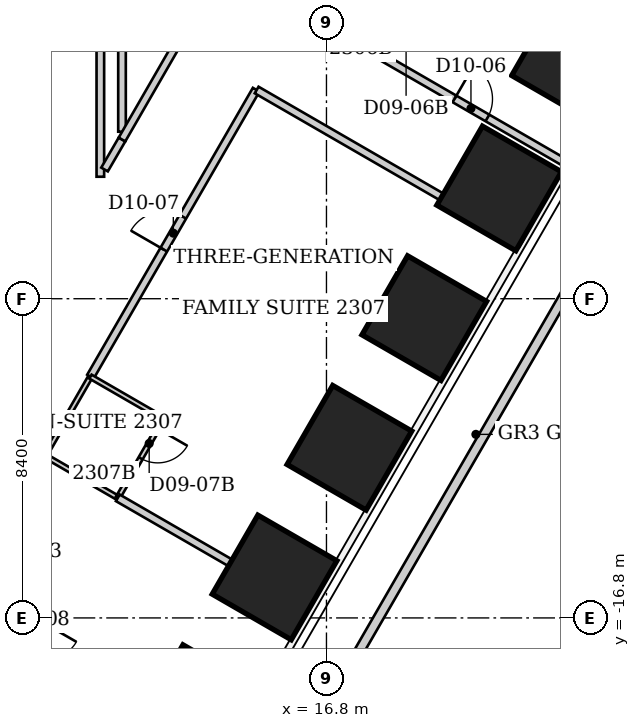
"""IFC4 building model, lengths in metres.
Left out: names, types, materials, properties, quantities, classifications, styles, units other than length and angle.
Written with IfcOpenShell. Run it as: python <this file> out.ifc"""

import sys

from ifc_helpers import new_model, si_unit, direction, frame, frame_2d, origin, origin_2d, place, context, subcontext, project, spatial, rectangle, extrude, clip, halfspace, element, fill, save


model = new_model("IFC4")
c1 = context("Model", 3, precision=1e-05, world=origin(), true_north=direction((0.0, 1.0)))
c2 = subcontext(c1, "Body", "Model", "MODEL_VIEW")
j1 = project(units=[si_unit("LENGTHUNIT", "METRE"), si_unit("PLANEANGLEUNIT", "RADIAN")], contexts=[c1])
p1 = place(None, origin())
s1 = spatial("IfcSite", under=j1, at=p1, CompositionType="ELEMENT")
p2 = place(p1, origin())
s2 = spatial("IfcBuilding", under=s1, at=p2, CompositionType="ELEMENT")
p3 = place(p2, frame((0.0, 0.0, 96.8)))
s3 = spatial("IfcBuildingStorey", under=s2, at=p3, CompositionType="ELEMENT", Elevation=96.8)
p4 = place(p3, frame((23.314, -2.087, -0.064), z_axis=(0.0, 0.0, 1.0), x_axis=(0.866025403784, -0.5, 0.0)))
e1 = element("IfcColumn", 1, at=p4, inside=s3, PredefinedType="COLUMN", context=c2, shape_type="SweptSolid", body=[
    clip(extrude(rectangle(XDim=2.4, YDim=2.4, at=origin_2d()), origin(), (0.0, 0.0, 1.0), 3.865), halfspace(frame((0.0, 0.0, 0.064)), True)),
])
p5 = place(p3, frame((21.344, -5.499, -0.056), z_axis=(0.0, 0.0, 1.0), x_axis=(0.866025403784, -0.5, 0.0)))
e2 = element("IfcColumn", 2, at=p5, inside=s3, PredefinedType="COLUMN", context=c2, shape_type="SweptSolid", body=[
    clip(extrude(rectangle(XDim=2.4, YDim=2.4, at=origin_2d()), origin(), (0.0, 0.0, 1.0), 3.856), halfspace(frame((0.0, 0.0, 0.056)), True)),
])
for number, where, z_axis, x_axis in (
    (3, (19.374, -8.911, -0.048), (0.0, 0.0, 1.0), (0.866, -0.5, 0.0)),
    (4, (17.404, -12.323, -0.048), (0.0, 0.0, 1.0), (0.866, -0.5, 0.0)),
):
    element("IfcColumn", number, at=place(p3, frame(where, z_axis=z_axis, x_axis=x_axis)), inside=s3, PredefinedType="COLUMN", context=c2, shape_type="SweptSolid", body=[
        clip(extrude(rectangle(XDim=2.4, YDim=2.4, at=origin_2d()), origin(), (0.0, 0.0, 1.0), 3.848), halfspace(frame((0.0, 0.0, 0.048)), True)),
    ])
p6 = place(p3, frame((15.434, -15.735, -0.056), z_axis=(0.0, 0.0, 1.0), x_axis=(0.866025403784, -0.5, 0.0)))
e5 = element("IfcColumn", 5, at=p6, inside=s3, PredefinedType="COLUMN", context=c2, shape_type="SweptSolid", body=[
    clip(extrude(rectangle(XDim=2.4, YDim=2.4, at=origin_2d()), origin(), (0.0, 0.0, 1.0), 3.856), halfspace(frame((0.0, 0.0, 0.056)), True)),
])
p7 = place(p3, frame((13.464, -19.147, -0.064), z_axis=(0.0, 0.0, 1.0), x_axis=(0.866025403784, -0.5, 0.0)))
e6 = element("IfcColumn", 6, at=p7, inside=s3, PredefinedType="COLUMN", context=c2, shape_type="SweptSolid", body=[
    clip(extrude(rectangle(XDim=2.4, YDim=2.4, at=origin_2d()), origin(), (0.0, 0.0, 1.0), 3.865), halfspace(frame((0.0, 0.0, 0.064)), True)),
])
p8 = place(p3, frame((11.024, -29.171, 0.0), z_axis=(0.0, 0.0, 1.0), x_axis=(0.499999235055, 0.866025845425, 0.0)))
e7 = element("IfcWall", 7, at=p8, inside=s3, PredefinedType="PARAPET", context=c2, shape_type="SweptSolid", body=[
    extrude(rectangle(XDim=39.5, YDim=0.25, at=frame_2d((19.75, 0.0))), origin(), (0.0, 0.0, 1.0), 1.1),
])
p9 = place(p3, frame((8.34, -18.89, 0.0), z_axis=(0.0, 0.0, 1.0), x_axis=(0.499159685399, 0.866510016372, 0.0)))
e8 = element("IfcWall", 8, at=p9, inside=s3, PredefinedType="PARTITIONING", context=c2, shape_type="SweptSolid", body=[
    extrude(rectangle(XDim=2.504, YDim=0.12, at=frame_2d((1.252, 0.0))), origin(), (0.0, 0.0, 1.0), 3.64),
])
p10 = place(p9, frame((1.304, 0.0, 0.0)))
e9 = element("IfcOpeningElement", 9, at=p10, cuts=e8, PredefinedType="OPENING", context=c2, shape_type="SweptSolid", body=[
    extrude(rectangle(XDim=0.9, YDim=2.03, at=frame_2d((0.45, 1.015))), frame((0.0, 0.06, 0.0), z_axis=(0.0, -1.0, 0.0), x_axis=(1.0, 0.0, 0.0)), (0.0, 0.0, 1.0), 0.12),
])
p11 = place(p3, frame((9.39, -12.53, 0.0), z_axis=(0.0, 0.0, 1.0), x_axis=(0.499769390944, 0.866158505053, 0.0)))
e10 = element("IfcWall", 10, at=p11, inside=s3, PredefinedType="PARTITIONING", context=c2, shape_type="SweptSolid", body=[
    extrude(rectangle(XDim=2.402, YDim=0.12, at=frame_2d((1.201, 0.0))), origin(), (0.0, 0.0, 1.0), 3.64),
])
p12 = place(p3, frame((9.39, -12.53, 0.0), z_axis=(0.0, 0.0, 1.0), x_axis=(0.865732595383, -0.500506816428, 0.0)))
e11 = element("IfcWall", 11, at=p12, inside=s3, PredefinedType="PARTITIONING", context=c2, shape_type="SweptSolid", body=[
    extrude(rectangle(XDim=2.218, YDim=0.12, at=frame_2d((1.109, 0.0))), origin(), (0.0, 0.0, 1.0), 3.64),
])
p13 = place(p3, frame((9.59, -16.72, 0.0), z_axis=(0.0, 0.0, 1.0), x_axis=(-0.865570669302, 0.500786797394, 0.0)))
e12 = element("IfcWall", 12, at=p13, inside=s3, PredefinedType="PARTITIONING", context=c2, shape_type="SweptSolid", body=[
    extrude(rectangle(XDim=2.276, YDim=0.12, at=frame_2d((1.138, 0.0))), origin(), (0.0, 0.0, 1.0), 3.64),
])
p14 = place(p3, frame((10.59, -10.45, 0.0), z_axis=(0.0, 0.0, 1.0), x_axis=(0.500072306674, 0.865983653482, 0.0)))
e13 = element("IfcWall", 13, at=p14, inside=s3, PredefinedType="PARTITIONING", context=c2, shape_type="SweptSolid", body=[
    extrude(rectangle(XDim=8.719, YDim=0.2, at=frame_2d((4.359, 0.0))), origin(), (0.0, 0.0, 1.0), 3.64),
])
p15 = place(p14, frame((3.859, 0.0, 0.0)))
e14 = element("IfcOpeningElement", 14, at=p15, cuts=e13, PredefinedType="OPENING", context=c2, shape_type="SweptSolid", body=[
    extrude(rectangle(XDim=1.0, YDim=2.13, at=frame_2d((0.5, 1.065))), frame((0.0, 0.1, 0.0), z_axis=(0.0, -1.0, 0.0), x_axis=(1.0, 0.0, 0.0)), (0.0, 0.0, 1.0), 0.2),
])
p16 = place(p3, frame((10.85, -5.19, 0.0), z_axis=(0.0, 0.0, 1.0), x_axis=(0.0, 1.0, 0.0)))
e15 = element("IfcWall", 15, at=p16, inside=s3, PredefinedType="PARTITIONING", context=c2, shape_type="SweptSolid", body=[
    extrude(rectangle(XDim=14.39, YDim=0.2, at=frame_2d((7.195, 0.0))), origin(), (0.0, 0.0, 1.0), 3.64),
])
p17 = place(p3, frame((11.31, -13.64, 0.0), z_axis=(0.0, 0.0, 1.0), x_axis=(0.499737123639, 0.866177122335, 0.0)))
e16 = element("IfcWall", 16, at=p17, inside=s3, PredefinedType="PARTITIONING", context=c2, shape_type="SweptSolid", body=[
    extrude(rectangle(XDim=2.401, YDim=0.12, at=frame_2d((1.201, 0.0))), origin(), (0.0, 0.0, 1.0), 3.64),
])
p18 = place(p17, frame((1.201, 0.0, 0.0)))
e17 = element("IfcOpeningElement", 17, at=p18, cuts=e16, PredefinedType="OPENING", context=c2, shape_type="SweptSolid", body=[
    extrude(rectangle(XDim=0.9, YDim=2.03, at=frame_2d((0.45, 1.015))), frame((0.0, 0.06, 0.0), z_axis=(0.0, -1.0, 0.0), x_axis=(1.0, 0.0, 0.0)), (0.0, 0.0, 1.0), 0.12),
])
p19 = place(p3, frame((11.31, -13.64, 0.0), z_axis=(0.0, 0.0, 1.0), x_axis=(0.865919350456, -0.50018364478, 0.0)))
e18 = element("IfcWall", 18, at=p19, inside=s3, PredefinedType="PARTITIONING", context=c2, shape_type="SweptSolid", body=[
    extrude(rectangle(XDim=5.758, YDim=0.2, at=frame_2d((2.879, 0.0))), origin(), (0.0, 0.0, 1.0), 3.64),
])
p20 = place(p3, frame((11.42, -4.21, 0.0), z_axis=(0.0, 0.0, 1.0), x_axis=(-0.502657614045, -0.8644855829, 0.0)))
e19 = element("IfcWall", 19, at=p20, inside=s3, PredefinedType="PARTITIONING", context=c2, shape_type="SweptSolid", body=[
    extrude(rectangle(XDim=0.914, YDim=0.2, at=frame_2d((0.457, 0.0))), origin(), (0.0, 0.0, 1.0), 3.64),
])
p21 = place(p3, frame((11.42, 10.98, 0.0), z_axis=(0.0, 0.0, 1.0), x_axis=(0.0, -1.0, 0.0)))
e20 = element("IfcWall", 20, at=p21, inside=s3, PredefinedType="PARTITIONING", context=c2, shape_type="SweptSolid", body=[
    extrude(rectangle(XDim=14.985, YDim=0.2, at=frame_2d((7.492, 0.0))), origin(), (0.0, 0.0, 1.0), 3.64),
])
p22 = place(p3, frame((12.51, -11.56, 0.0), z_axis=(0.0, 0.0, 1.0), x_axis=(-0.865705017107, 0.500554515868, 0.0)))
e21 = element("IfcWall", 21, at=p22, inside=s3, PredefinedType="PARTITIONING", context=c2, shape_type="SweptSolid", body=[
    extrude(rectangle(XDim=2.218, YDim=0.12, at=frame_2d((1.109, 0.0))), origin(), (0.0, 0.0, 1.0), 3.64),
])
p23 = place(p3, frame((14.963, -2.907, 0.0), z_axis=(0.0, 0.0, 1.0), x_axis=(0.865876457216, -0.50025789433, 0.0)))
e22 = element("IfcWall", 22, at=p23, inside=s3, PredefinedType="PARTITIONING", context=c2, shape_type="SweptSolid", body=[
    extrude(rectangle(XDim=8.051, YDim=0.2, at=frame_2d((4.025, 0.0))), origin(), (0.0, 0.0, 1.0), 3.64),
])
p24 = place(p3, frame((15.98, 3.7, 0.0), z_axis=(0.0, 0.0, 1.0), x_axis=(-0.499446957289, -0.866344467781, 0.0)))
e23 = element("IfcWall", 23, at=p24, inside=s3, PredefinedType="PARTITIONING", context=c2, shape_type="SweptSolid", body=[
    extrude(rectangle(XDim=9.13, YDim=0.2, at=frame_2d((4.565, 0.0))), origin(), (0.0, 0.0, 1.0), 3.64),
])
p25 = place(p24, frame((4.015, 0.0, 0.0)))
e24 = element("IfcOpeningElement", 24, at=p25, cuts=e23, PredefinedType="OPENING", context=c2, shape_type="SweptSolid", body=[
    extrude(rectangle(XDim=1.1, YDim=2.2, at=frame_2d((0.55, 1.1))), frame((0.0, 0.1, 0.0), z_axis=(0.0, -1.0, 0.0), x_axis=(1.0, 0.0, 0.0)), (0.0, 0.0, 1.0), 0.2),
])
p26 = place(p3, frame((16.15, -0.82, 0.0), z_axis=(0.0, 0.0, 1.0), x_axis=(0.865780289733, -0.50042430987, 0.0)))
e25 = element("IfcWall", 25, at=p26, inside=s3, PredefinedType="PARTITIONING", context=c2, shape_type="SweptSolid", body=[
    extrude(rectangle(XDim=2.218, YDim=0.12, at=frame_2d((1.109, 0.0))), origin(), (0.0, 0.0, 1.0), 3.64),
])
p27 = place(p3, frame((18.07, -1.93, 0.0), z_axis=(0.0, 0.0, 1.0), x_axis=(0.499737123639, 0.866177122335, 0.0)))
e26 = element("IfcWall", 26, at=p27, inside=s3, PredefinedType="PARTITIONING", context=c2, shape_type="SweptSolid", body=[
    extrude(rectangle(XDim=2.401, YDim=0.12, at=frame_2d((1.201, 0.0))), origin(), (0.0, 0.0, 1.0), 3.64),
])
p28 = place(p27, frame((1.201, 0.0, 0.0)))
e27 = element("IfcOpeningElement", 27, at=p28, cuts=e26, PredefinedType="OPENING", context=c2, shape_type="SweptSolid", body=[
    extrude(rectangle(XDim=0.9, YDim=2.03, at=frame_2d((0.45, 1.015))), frame((0.0, 0.06, 0.0), z_axis=(0.0, -1.0, 0.0), x_axis=(1.0, 0.0, 0.0)), (0.0, 0.0, 1.0), 0.12),
])
p29 = place(p3, frame((18.07, -1.93, 0.0), z_axis=(0.0, 0.0, 1.0), x_axis=(0.865924141063, -0.500175351175, 0.0)))
e28 = element("IfcWall", 28, at=p29, inside=s3, PredefinedType="PARTITIONING", context=c2, shape_type="SweptSolid", body=[
    extrude(rectangle(XDim=5.848, YDim=0.2, at=frame_2d((2.924, 0.0))), origin(), (0.0, 0.0, 1.0), 3.64),
])
p30 = place(p29, frame((2.424, 0.0, 0.0)))
e29 = element("IfcOpeningElement", 29, at=p30, cuts=e28, PredefinedType="OPENING", context=c2, shape_type="SweptSolid", body=[
    extrude(rectangle(XDim=1.0, YDim=2.13, at=frame_2d((0.5, 1.065))), frame((0.0, 0.1, 0.0), z_axis=(0.0, -1.0, 0.0), x_axis=(1.0, 0.0, 0.0)), (0.0, 0.0, 1.0), 0.2),
])
p31 = place(p30, origin())
e30 = element("IfcDoor", 30, at=p31, inside=s3, OperationType="SINGLE_SWING_LEFT", PredefinedType="DOOR", context=c2, shape_type="SweptSolid", body=[
    extrude(rectangle(XDim=1.0, YDim=2.13, at=frame_2d((0.5, 1.065))), frame((0.0, 0.025, 0.0), z_axis=(0.0, -1.0, 0.0), x_axis=(1.0, 0.0, 0.0)), (0.0, 0.0, 1.0), 0.05),
])
fill(e29, e30)
p32 = place(p15, origin())
e31 = element("IfcDoor", 31, at=p32, inside=s3, OperationType="SINGLE_SWING_LEFT", PredefinedType="DOOR", context=c2, shape_type="SweptSolid", body=[
    extrude(rectangle(XDim=1.0, YDim=2.13, at=frame_2d((0.5, 1.065))), frame((0.0, 0.025, 0.0), z_axis=(0.0, -1.0, 0.0), x_axis=(1.0, 0.0, 0.0)), (0.0, 0.0, 1.0), 0.05),
])
fill(e14, e31)
p33 = place(p18, origin())
e32 = element("IfcDoor", 32, at=p33, inside=s3, OperationType="SINGLE_SWING_RIGHT", PredefinedType="DOOR", context=c2, shape_type="SweptSolid", body=[
    extrude(rectangle(XDim=0.9, YDim=2.03, at=frame_2d((0.45, 1.015))), frame((0.0, 0.025, 0.0), z_axis=(0.0, -1.0, 0.0), x_axis=(1.0, 0.0, 0.0)), (0.0, 0.0, 1.0), 0.05),
])
fill(e17, e32)
save(model, sys.argv[1])
